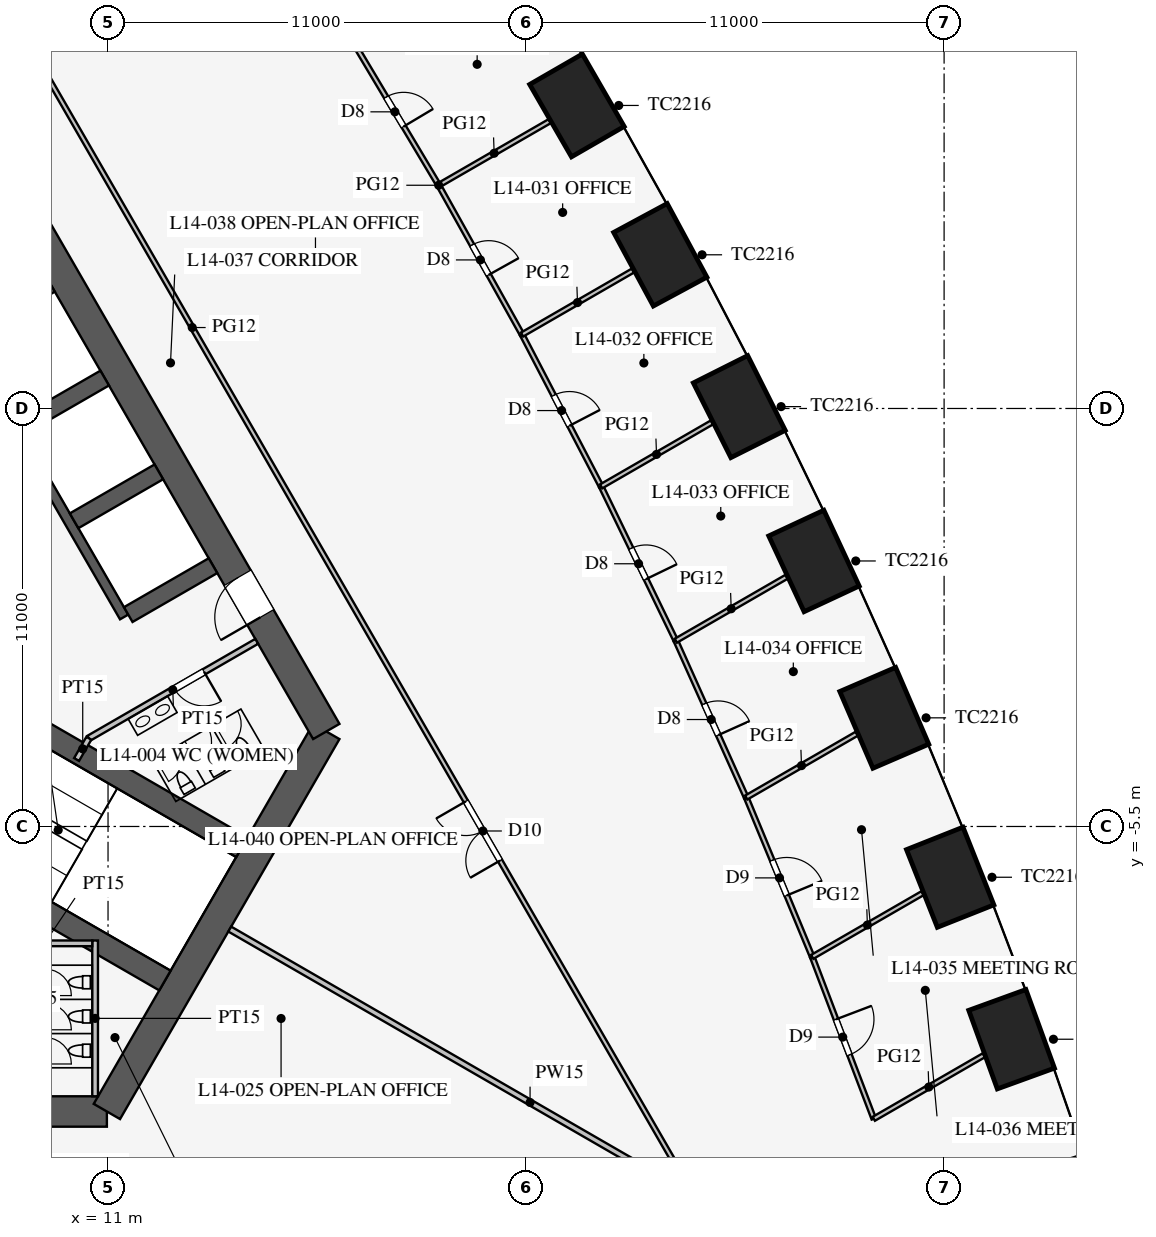
"""IFC4 building model, lengths in metres.
Left out: names, types, materials, properties, quantities, classifications, styles, units other than length and angle.
Written with IfcOpenShell. Run it as: python <this file> out.ifc"""

import sys

from ifc_helpers import new_model, si_unit, direction, frame, frame_2d, origin, origin_2d, place, context, subcontext, project, spatial, rectangle, extrude, element, fill, save


model = new_model("IFC4")
c1 = context("Model", 3, precision=1e-05, world=origin(), true_north=direction((0.0, 1.0)))
c2 = subcontext(c1, "Body", "Model", "MODEL_VIEW")
j1 = project(units=[si_unit("LENGTHUNIT", "METRE"), si_unit("PLANEANGLEUNIT", "RADIAN")], contexts=[c1])
p1 = place(None, origin())
s1 = spatial("IfcSite", under=j1, at=p1, CompositionType="ELEMENT")
p2 = place(p1, origin())
s2 = spatial("IfcBuilding", under=s1, at=p2, CompositionType="ELEMENT")
p3 = place(p2, frame((0.0, 0.0, 62.7)))
s3 = spatial("IfcBuildingStorey", under=s2, at=p3, CompositionType="ELEMENT", Elevation=62.7)
for number, where, z_axis, x_axis in (
    (1, (36.262, -15.438, 0.0), (0.0, 0.0, 1.0), (-0.3, 0.954, 0.0)),
    (2, (34.776, -11.099, 0.0), (0.0, 0.0, 1.0), (-0.342, 0.94, 0.0)),
    (3, (33.16, -6.836, 0.0), (0.0, 0.0, 1.0), (-0.369, 0.929, 0.0)),
    (4, (31.426, -2.641, 0.0), (0.0, 0.0, 1.0), (-0.396, 0.918, 0.0)),
    (5, (29.576, 1.487, 0.0), (0.0, 0.0, 1.0), (-0.423, 0.906, 0.0)),
    (6, (27.611, 5.549, 0.0), (0.0, 0.0, 1.0), (-0.449, 0.894, 0.0)),
    (7, (25.531, 9.544, 0.0), (0.0, 0.0, 1.0), (-0.475, 0.88, 0.0)),
    (8, (23.338, 13.474, 0.0), (0.0, 0.0, 1.0), (-0.5, 0.866, 0.0)),
):
    element("IfcColumn", number, at=place(p3, frame(where, z_axis=z_axis, x_axis=x_axis)), inside=s3, PredefinedType="COLUMN", context=c2, shape_type="SweptSolid", body=[
        extrude(rectangle(XDim=2.2, YDim=1.6, at=origin_2d()), origin(), (0.0, 0.0, 1.0), 4.2),
    ])
p4 = place(p3, frame((-10.97, -13.0, 0.0), z_axis=(0.0, 0.0, 1.0), x_axis=(1.0, 0.0, 0.0)))
e9 = element("IfcWall", 9, at=p4, inside=s3, PredefinedType="SHEAR", context=c2, shape_type="SweptSolid", body=[
    extrude(rectangle(XDim=21.939, YDim=0.8, at=frame_2d((10.97, 0.0))), origin(), (0.0, 0.0, 1.0), 4.2),
])
p5 = place(p4, frame((17.27, 0.0, 0.0)))
e10 = element("IfcOpeningElement", 10, at=p5, cuts=e9, PredefinedType="OPENING", context=c2, shape_type="SweptSolid", body=[
    extrude(rectangle(XDim=1.2, YDim=2.1, at=frame_2d((0.6, 1.05))), frame((0.0, 0.41, 0.0), z_axis=(0.0, -1.0, 0.0), x_axis=(1.0, 0.0, 0.0)), (0.0, 0.0, 1.0), 0.82),
])
p6 = place(p4, frame((3.47, 0.0, 0.0)))
e11 = element("IfcOpeningElement", 11, at=p6, cuts=e9, PredefinedType="OPENING", context=c2, shape_type="SweptSolid", body=[
    extrude(rectangle(XDim=1.2, YDim=2.1, at=frame_2d((0.6, 1.05))), frame((0.0, 0.41, 0.0), z_axis=(0.0, -1.0, 0.0), x_axis=(1.0, 0.0, 0.0)), (0.0, 0.0, 1.0), 0.82),
])
p7 = place(p3, frame((10.97, -13.0, 0.0), z_axis=(0.0, 0.0, 1.0), x_axis=(0.499995765644, 0.866027848477, 0.0)))
e12 = element("IfcWall", 12, at=p7, inside=s3, PredefinedType="SHEAR", context=c2, shape_type="SweptSolid", body=[
    extrude(rectangle(XDim=11.547, YDim=0.8, at=frame_2d((5.773, 0.0))), origin(), (0.0, 0.0, 1.0), 4.2),
])
p8 = place(p3, frame((16.743, -3.0, 0.0), z_axis=(0.0, 0.0, 1.0), x_axis=(-0.500002442456, 0.866023993627, 0.0)))
e13 = element("IfcWall", 13, at=p8, inside=s3, PredefinedType="SHEAR", context=c2, shape_type="SweptSolid", body=[
    extrude(rectangle(XDim=21.939, YDim=0.8, at=frame_2d((10.97, 0.0))), origin(), (0.0, 0.0, 1.0), 4.2),
])
p9 = place(p8, frame((17.27, 0.0, 0.0)))
e14 = element("IfcOpeningElement", 14, at=p9, cuts=e13, PredefinedType="OPENING", context=c2, shape_type="SweptSolid", body=[
    extrude(rectangle(XDim=1.2, YDim=2.1, at=frame_2d((0.6, 1.05))), frame((0.0, 0.41, 0.0), z_axis=(0.0, -1.0, 0.0), x_axis=(1.0, 0.0, 0.0)), (0.0, 0.0, 1.0), 0.82),
])
p10 = place(p8, frame((3.47, 0.0, 0.0)))
e15 = element("IfcOpeningElement", 15, at=p10, cuts=e13, PredefinedType="OPENING", context=c2, shape_type="SweptSolid", body=[
    extrude(rectangle(XDim=1.2, YDim=2.1, at=frame_2d((0.6, 1.05))), frame((0.0, 0.41, 0.0), z_axis=(0.0, -1.0, 0.0), x_axis=(1.0, 0.0, 0.0)), (0.0, 0.0, 1.0), 0.82),
])
p11 = place(p3, frame((11.424, 0.014, 0.0), z_axis=(0.0, 0.0, 1.0), x_axis=(-0.500001763848, 0.866024385424, 0.0)))
e16 = element("IfcWall", 16, at=p11, inside=s3, PredefinedType="SHEAR", context=c2, shape_type="SweptSolid", body=[
    extrude(rectangle(XDim=11.4, YDim=0.25, at=frame_2d((5.7, 0.0))), origin(), (0.0, 0.0, 1.0), 4.2),
])
for number, where, z_axis, x_axis in (
    (17, (11.532, 0.076, 0.0), (0.0, 0.0, 1.0), (0.866, 0.5, 0.0)),
    (18, (10.107, 2.544, 0.0), (0.0, 0.0, 1.0), (0.866, 0.5, 0.0)),
    (19, (8.682, 5.012, 0.0), (0.0, 0.0, 1.0), (0.866, 0.5, 0.0)),
    (20, (7.257, 7.481, 0.0), (0.0, 0.0, 1.0), (0.866, 0.5, 0.0)),
):
    element("IfcWall", number, at=place(p3, frame(where, z_axis=z_axis, x_axis=x_axis)), inside=s3, PredefinedType="SHEAR", context=c2, shape_type="SweptSolid", body=[
        extrude(rectangle(XDim=2.575, YDim=0.45, at=frame_2d((1.288, 0.0))), origin(), (0.0, 0.0, 1.0), 4.2),
    ])
for number, where, z_axis, x_axis in (
    (21, (4.638, -5.016, 0.0), (0.0, 0.0, 1.0), (0.866, -0.5, 0.0)),
    (22, (6.663, -1.509, 0.0), (0.0, 0.0, 1.0), (0.866, -0.5, 0.0)),
):
    element("IfcWall", number, at=place(p3, frame(where, z_axis=z_axis, x_axis=x_axis)), inside=s3, PredefinedType="SHEAR", context=c2, shape_type="SweptSolid", body=[
        extrude(rectangle(XDim=9.075, YDim=0.6, at=frame_2d((4.538, 0.0))), origin(), (0.0, 0.0, 1.0), 4.2),
    ])
p12 = place(p3, frame((10.495, -3.178, 0.0), z_axis=(0.0, 0.0, 1.0), x_axis=(0.86602216432, 0.500005610874, 0.0)))
e23 = element("IfcWall", 23, at=p12, inside=s3, PredefinedType="PARTITIONING", context=c2, shape_type="SweptSolid", body=[
    extrude(rectangle(XDim=5.1, YDim=0.15, at=frame_2d((2.55, 0.0))), origin(), (0.0, 0.0, 1.0), 4.0),
])
p13 = place(p12, frame((2.6, 0.0, 0.0)))
e24 = element("IfcOpeningElement", 24, at=p13, cuts=e23, PredefinedType="OPENING", context=c2, shape_type="SweptSolid", body=[
    extrude(rectangle(XDim=0.9, YDim=2.1, at=frame_2d((0.45, 1.05))), frame((0.0, 0.085, 0.0), z_axis=(0.0, -1.0, 0.0), x_axis=(1.0, 0.0, 0.0)), (0.0, 0.0, 1.0), 0.17),
])
p14 = place(p3, frame((10.495, -3.178, 0.0), z_axis=(0.0, 0.0, 1.0), x_axis=(-0.499842556608, -0.866116284689, 0.0)))
e25 = element("IfcWall", 25, at=p14, inside=s3, PredefinedType="PARTITIONING", context=c2, shape_type="SweptSolid", body=[
    extrude(rectangle(XDim=0.645, YDim=0.15, at=frame_2d((0.323, 0.0))), origin(), (0.0, 0.0, 1.0), 4.0),
])
p15 = place(p3, frame((10.66, -8.5, 0.0), z_axis=(0.0, 0.0, 1.0), x_axis=(0.0, -1.0, 0.0)))
e26 = element("IfcWall", 26, at=p15, inside=s3, PredefinedType="PARTITIONING", context=c2, shape_type="SweptSolid", body=[
    extrude(rectangle(XDim=4.1, YDim=0.15, at=frame_2d((2.05, 0.0))), origin(), (0.0, 0.0, 1.0), 4.0),
])
p16 = place(p3, frame((8.075, -8.575, 0.0), z_axis=(0.0, 0.0, 1.0), x_axis=(1.0, 0.0, 0.0)))
e27 = element("IfcWall", 27, at=p16, inside=s3, PredefinedType="PARTITIONING", context=c2, shape_type="SweptSolid", body=[
    extrude(rectangle(XDim=2.51, YDim=0.15, at=frame_2d((1.255, 0.0))), origin(), (0.0, 0.0, 1.0), 4.0),
])
p17 = place(p3, frame((14.203, -8.2, 0.0), z_axis=(0.0, 0.0, 1.0), x_axis=(0.866024965723, -0.500000758745, 0.0)))
e28 = element("IfcWall", 28, at=p17, inside=s3, PredefinedType="PARTITIONING", context=c2, shape_type="SweptSolid", body=[
    extrude(rectangle(XDim=18.25, YDim=0.15, at=frame_2d((9.125, 0.0))), origin(), (0.0, 0.0, 1.0), 2.3),
])
p18 = place(p3, frame((26.415, -15.231, 0.0), z_axis=(0.0, 0.0, 1.0), x_axis=(-0.50000091641, 0.866024874695, 0.0)))
e29 = element("IfcWall", 29, at=p18, inside=s3, PredefinedType="PARTITIONING", context=c2, shape_type="SweptSolid", body=[
    extrude(rectangle(XDim=52.796, YDim=0.12, at=frame_2d((26.398, 0.0))), origin(), (0.0, 0.0, 1.0), 2.9),
])
p19 = place(p18, frame((10.2, 0.0, 0.15)))
e30 = element("IfcOpeningElement", 30, at=p19, cuts=e29, PredefinedType="OPENING", context=c2, shape_type="SweptSolid", body=[
    extrude(rectangle(XDim=1.8, YDim=2.1, at=frame_2d((0.9, 1.05))), frame((0.0, 0.07, 0.0), z_axis=(0.0, -1.0, 0.0), x_axis=(1.0, 0.0, 0.0)), (0.0, 0.0, 1.0), 0.14),
])
p20 = place(p18, frame((40.8, 0.0, 0.15)))
e31 = element("IfcOpeningElement", 31, at=p20, cuts=e29, PredefinedType="OPENING", context=c2, shape_type="SweptSolid", body=[
    extrude(rectangle(XDim=1.8, YDim=2.1, at=frame_2d((0.9, 1.05))), frame((0.0, 0.07, 0.0), z_axis=(0.0, -1.0, 0.0), x_axis=(1.0, 0.0, 0.0)), (0.0, 0.0, 1.0), 0.14),
])
p21 = place(p3, frame((19.701, 11.374, 0.0), z_axis=(0.0, 0.0, 1.0), x_axis=(-0.512483962191, 0.858696796604, 0.0)))
e32 = element("IfcWall", 32, at=p21, inside=s3, PredefinedType="PARTITIONING", context=c2, shape_type="SweptSolid", body=[
    extrude(rectangle(XDim=4.5, YDim=0.12, at=frame_2d((2.25, 0.0))), origin(), (0.0, 0.0, 1.0), 2.9),
])
p22 = place(p21, frame((1.8, 0.0, 0.15)))
e33 = element("IfcOpeningElement", 33, at=p22, cuts=e32, PredefinedType="OPENING", context=c2, shape_type="SweptSolid", body=[
    extrude(rectangle(XDim=0.9, YDim=2.1, at=frame_2d((0.45, 1.05))), frame((0.0, 0.07, 0.0), z_axis=(0.0, -1.0, 0.0), x_axis=(1.0, 0.0, 0.0)), (0.0, 0.0, 1.0), 0.14),
])
p23 = place(p3, frame((25.941, -0.611, 0.0), z_axis=(0.0, 0.0, 1.0), x_axis=(-0.435857917556, 0.900015486369, 0.0)))
e34 = element("IfcWall", 34, at=p23, inside=s3, PredefinedType="PARTITIONING", context=c2, shape_type="SweptSolid", body=[
    extrude(rectangle(XDim=4.512, YDim=0.12, at=frame_2d((2.256, 0.0))), origin(), (0.0, 0.0, 1.0), 2.9),
])
p24 = place(p23, frame((1.8, 0.0, 0.15)))
e35 = element("IfcOpeningElement", 35, at=p24, cuts=e34, PredefinedType="OPENING", context=c2, shape_type="SweptSolid", body=[
    extrude(rectangle(XDim=0.9, YDim=2.1, at=frame_2d((0.45, 1.05))), frame((0.0, 0.07, 0.0), z_axis=(0.0, -1.0, 0.0), x_axis=(1.0, 0.0, 0.0)), (0.0, 0.0, 1.0), 0.14),
])
p25 = place(p3, frame((27.793, -4.738, 0.0), z_axis=(0.0, 0.0, 1.0), x_axis=(-0.409451055745, 0.912332084796, 0.0)))
e36 = element("IfcWall", 36, at=p25, inside=s3, PredefinedType="PARTITIONING", context=c2, shape_type="SweptSolid", body=[
    extrude(rectangle(XDim=4.523, YDim=0.12, at=frame_2d((2.262, 0.0))), origin(), (0.0, 0.0, 1.0), 2.9),
])
p26 = place(p25, frame((1.8, 0.0, 0.15)))
e37 = element("IfcOpeningElement", 37, at=p26, cuts=e36, PredefinedType="OPENING", context=c2, shape_type="SweptSolid", body=[
    extrude(rectangle(XDim=0.9, YDim=2.1, at=frame_2d((0.45, 1.05))), frame((0.0, 0.07, 0.0), z_axis=(0.0, -1.0, 0.0), x_axis=(1.0, 0.0, 0.0)), (0.0, 0.0, 1.0), 0.14),
])
p27 = place(p3, frame((29.53, -8.932, 0.0), z_axis=(0.0, 0.0, 1.0), x_axis=(-0.382639984525, 0.923897527999, 0.0)))
e38 = element("IfcWall", 38, at=p27, inside=s3, PredefinedType="PARTITIONING", context=c2, shape_type="SweptSolid", body=[
    extrude(rectangle(XDim=4.539, YDim=0.12, at=frame_2d((2.27, 0.0))), origin(), (0.0, 0.0, 1.0), 2.9),
])
p28 = place(p27, frame((1.75, 0.0, 0.15)))
e39 = element("IfcOpeningElement", 39, at=p28, cuts=e38, PredefinedType="OPENING", context=c2, shape_type="SweptSolid", body=[
    extrude(rectangle(XDim=1.0, YDim=2.1, at=frame_2d((0.5, 1.05))), frame((0.0, 0.07, 0.0), z_axis=(0.0, -1.0, 0.0), x_axis=(1.0, 0.0, 0.0)), (0.0, 0.0, 1.0), 0.14),
])
p29 = place(p3, frame((31.15, -13.192, 0.0), z_axis=(0.0, 0.0, 1.0), x_axis=(-0.355369393324, 0.934725946087, 0.0)))
e40 = element("IfcWall", 40, at=p29, inside=s3, PredefinedType="PARTITIONING", context=c2, shape_type="SweptSolid", body=[
    extrude(rectangle(XDim=4.558, YDim=0.12, at=frame_2d((2.279, 0.0))), origin(), (0.0, 0.0, 1.0), 2.9),
])
p30 = place(p29, frame((1.8, 0.0, 0.15)))
e41 = element("IfcOpeningElement", 41, at=p30, cuts=e40, PredefinedType="OPENING", context=c2, shape_type="SweptSolid", body=[
    extrude(rectangle(XDim=1.0, YDim=2.1, at=frame_2d((0.5, 1.05))), frame((0.0, 0.07, 0.0), z_axis=(0.0, -1.0, 0.0), x_axis=(1.0, 0.0, 0.0)), (0.0, 0.0, 1.0), 0.14),
])
p31 = place(p3, frame((21.895, 7.445, 0.0), z_axis=(0.0, 0.0, 1.0), x_axis=(-0.487415216275, 0.87317031955, 0.0)))
e42 = element("IfcWall", 42, at=p31, inside=s3, PredefinedType="PARTITIONING", context=c2, shape_type="SweptSolid", body=[
    extrude(rectangle(XDim=4.5, YDim=0.12, at=frame_2d((2.25, 0.0))), origin(), (0.0, 0.0, 1.0), 2.9),
])
p32 = place(p31, frame((1.8, 0.0, 0.15)))
e43 = element("IfcOpeningElement", 43, at=p32, cuts=e42, PredefinedType="OPENING", context=c2, shape_type="SweptSolid", body=[
    extrude(rectangle(XDim=0.9, YDim=2.1, at=frame_2d((0.45, 1.05))), frame((0.0, 0.07, 0.0), z_axis=(0.0, -1.0, 0.0), x_axis=(1.0, 0.0, 0.0)), (0.0, 0.0, 1.0), 0.14),
])
p33 = place(p3, frame((23.975, 3.449, 0.0), z_axis=(0.0, 0.0, 1.0), x_axis=(-0.461810056307, 0.886978845235, 0.0)))
e44 = element("IfcWall", 44, at=p33, inside=s3, PredefinedType="PARTITIONING", context=c2, shape_type="SweptSolid", body=[
    extrude(rectangle(XDim=4.504, YDim=0.12, at=frame_2d((2.252, 0.0))), origin(), (0.0, 0.0, 1.0), 2.9),
])
p34 = place(p33, frame((1.8, 0.0, 0.15)))
e45 = element("IfcOpeningElement", 45, at=p34, cuts=e44, PredefinedType="OPENING", context=c2, shape_type="SweptSolid", body=[
    extrude(rectangle(XDim=0.9, YDim=2.1, at=frame_2d((0.45, 1.05))), frame((0.0, 0.07, 0.0), z_axis=(0.0, -1.0, 0.0), x_axis=(1.0, 0.0, 0.0)), (0.0, 0.0, 1.0), 0.14),
])
p35 = place(p3, frame((19.701, 11.374, 0.0), z_axis=(0.0, 0.0, 1.0), x_axis=(0.866014270972, 0.500019282102, 0.0)))
e46 = element("IfcWall", 46, at=p35, inside=s3, PredefinedType="PARTITIONING", context=c2, shape_type="SweptSolid", body=[
    extrude(rectangle(XDim=3.37, YDim=0.12, at=frame_2d((1.685, 0.0))), origin(), (0.0, 0.0, 1.0), 2.8),
])
p36 = place(p3, frame((25.941, -0.611, 0.0), z_axis=(0.0, 0.0, 1.0), x_axis=(0.866023625329, 0.500003080363, 0.0)))
e47 = element("IfcWall", 47, at=p36, inside=s3, PredefinedType="PARTITIONING", context=c2, shape_type="SweptSolid", body=[
    extrude(rectangle(XDim=3.364, YDim=0.12, at=frame_2d((1.682, 0.0))), origin(), (0.0, 0.0, 1.0), 2.6),
])
p37 = place(p3, frame((27.793, -4.738, 0.0), z_axis=(0.0, 0.0, 1.0), x_axis=(0.866029446706, 0.499992997389, 0.0)))
e48 = element("IfcWall", 48, at=p37, inside=s3, PredefinedType="PARTITIONING", context=c2, shape_type="SweptSolid", body=[
    extrude(rectangle(XDim=3.359, YDim=0.12, at=frame_2d((1.679, 0.0))), origin(), (0.0, 0.0, 1.0), 2.6),
])
p38 = place(p3, frame((29.53, -8.932, 0.0), z_axis=(0.0, 0.0, 1.0), x_axis=(0.866038859646, 0.49997669304, 0.0)))
e49 = element("IfcWall", 49, at=p38, inside=s3, PredefinedType="PARTITIONING", context=c2, shape_type="SweptSolid", body=[
    extrude(rectangle(XDim=3.353, YDim=0.12, at=frame_2d((1.676, 0.0))), origin(), (0.0, 0.0, 1.0), 2.8),
])
p39 = place(p3, frame((31.15, -13.192, 0.0), z_axis=(0.0, 0.0, 1.0), x_axis=(0.866033651025, 0.499985715088, 0.0)))
e50 = element("IfcWall", 50, at=p39, inside=s3, PredefinedType="PARTITIONING", context=c2, shape_type="SweptSolid", body=[
    extrude(rectangle(XDim=3.345, YDim=0.12, at=frame_2d((1.672, 0.0))), origin(), (0.0, 0.0, 1.0), 2.9),
])
p40 = place(p3, frame((21.895, 7.445, 0.0), z_axis=(0.0, 0.0, 1.0), x_axis=(0.866022675988, 0.500004724652, 0.0)))
e51 = element("IfcWall", 51, at=p40, inside=s3, PredefinedType="PARTITIONING", context=c2, shape_type="SweptSolid", body=[
    extrude(rectangle(XDim=3.369, YDim=0.12, at=frame_2d((1.685, 0.0))), origin(), (0.0, 0.0, 1.0), 2.8),
])
p41 = place(p3, frame((23.975, 3.449, 0.0), z_axis=(0.0, 0.0, 1.0), x_axis=(0.866039498442, 0.499975586543, 0.0)))
e52 = element("IfcWall", 52, at=p41, inside=s3, PredefinedType="PARTITIONING", context=c2, shape_type="SweptSolid", body=[
    extrude(rectangle(XDim=3.367, YDim=0.12, at=frame_2d((1.684, 0.0))), origin(), (0.0, 0.0, 1.0), 2.8),
])
p42 = place(p13, frame((0.9, 0.0, 0.0), z_axis=(0.0, 0.0, 1.0), x_axis=(-1.0, 0.0, 0.0)))
e53 = element("IfcDoor", 53, at=p42, inside=s3, OperationType="SINGLE_SWING_LEFT", PredefinedType="DOOR", context=c2, shape_type="SweptSolid", body=[
    extrude(rectangle(XDim=0.9, YDim=2.1, at=frame_2d((0.45, 1.05))), frame((0.0, 0.025, 0.0), z_axis=(0.0, -1.0, 0.0), x_axis=(1.0, 0.0, 0.0)), (0.0, 0.0, 1.0), 0.05),
])
fill(e24, e53)
p43 = place(p10, origin())
e54 = element("IfcDoor", 54, at=p43, inside=s3, OperationType="SINGLE_SWING_LEFT", PredefinedType="DOOR", context=c2, shape_type="SweptSolid", body=[
    extrude(rectangle(XDim=1.2, YDim=2.1, at=frame_2d((0.6, 1.05))), frame((0.0, 0.025, 0.0), z_axis=(0.0, -1.0, 0.0), x_axis=(1.0, 0.0, 0.0)), (0.0, 0.0, 1.0), 0.05),
])
fill(e15, e54)
p44 = place(p22, frame((0.9, 0.0, 0.0), z_axis=(0.0, 0.0, 1.0), x_axis=(-1.0, 0.0, 0.0)))
e55 = element("IfcDoor", 55, at=p44, inside=s3, OperationType="SINGLE_SWING_RIGHT", PredefinedType="DOOR", context=c2, shape_type="SweptSolid", body=[
    extrude(rectangle(XDim=0.9, YDim=2.1, at=frame_2d((0.45, 1.05))), frame((0.0, 0.025, 0.0), z_axis=(0.0, -1.0, 0.0), x_axis=(1.0, 0.0, 0.0)), (0.0, 0.0, 1.0), 0.05),
])
fill(e33, e55)
p45 = place(p32, frame((0.9, 0.0, 0.0), z_axis=(0.0, 0.0, 1.0), x_axis=(-1.0, 0.0, 0.0)))
e56 = element("IfcDoor", 56, at=p45, inside=s3, OperationType="SINGLE_SWING_RIGHT", PredefinedType="DOOR", context=c2, shape_type="SweptSolid", body=[
    extrude(rectangle(XDim=0.9, YDim=2.1, at=frame_2d((0.45, 1.05))), frame((0.0, 0.025, 0.0), z_axis=(0.0, -1.0, 0.0), x_axis=(1.0, 0.0, 0.0)), (0.0, 0.0, 1.0), 0.05),
])
fill(e43, e56)
p46 = place(p34, frame((0.9, 0.0, 0.0), z_axis=(0.0, 0.0, 1.0), x_axis=(-1.0, 0.0, 0.0)))
e57 = element("IfcDoor", 57, at=p46, inside=s3, OperationType="SINGLE_SWING_RIGHT", PredefinedType="DOOR", context=c2, shape_type="SweptSolid", body=[
    extrude(rectangle(XDim=0.9, YDim=2.1, at=frame_2d((0.45, 1.05))), frame((0.0, 0.025, 0.0), z_axis=(0.0, -1.0, 0.0), x_axis=(1.0, 0.0, 0.0)), (0.0, 0.0, 1.0), 0.05),
])
fill(e45, e57)
p47 = place(p24, frame((0.9, 0.0, 0.0), z_axis=(0.0, 0.0, 1.0), x_axis=(-1.0, 0.0, 0.0)))
e58 = element("IfcDoor", 58, at=p47, inside=s3, OperationType="SINGLE_SWING_RIGHT", PredefinedType="DOOR", context=c2, shape_type="SweptSolid", body=[
    extrude(rectangle(XDim=0.9, YDim=2.1, at=frame_2d((0.45, 1.05))), frame((0.0, 0.025, 0.0), z_axis=(0.0, -1.0, 0.0), x_axis=(1.0, 0.0, 0.0)), (0.0, 0.0, 1.0), 0.05),
])
fill(e35, e58)
p48 = place(p26, frame((0.9, 0.0, 0.0), z_axis=(0.0, 0.0, 1.0), x_axis=(-1.0, 0.0, 0.0)))
e59 = element("IfcDoor", 59, at=p48, inside=s3, OperationType="SINGLE_SWING_RIGHT", PredefinedType="DOOR", context=c2, shape_type="SweptSolid", body=[
    extrude(rectangle(XDim=0.9, YDim=2.1, at=frame_2d((0.45, 1.05))), frame((0.0, 0.025, 0.0), z_axis=(0.0, -1.0, 0.0), x_axis=(1.0, 0.0, 0.0)), (0.0, 0.0, 1.0), 0.05),
])
fill(e37, e59)
p49 = place(p28, frame((1.0, 0.0, 0.0), z_axis=(0.0, 0.0, 1.0), x_axis=(-1.0, 0.0, 0.0)))
e60 = element("IfcDoor", 60, at=p49, inside=s3, OperationType="SINGLE_SWING_RIGHT", PredefinedType="DOOR", context=c2, shape_type="SweptSolid", body=[
    extrude(rectangle(XDim=1.0, YDim=2.1, at=frame_2d((0.5, 1.05))), frame((0.0, 0.025, 0.0), z_axis=(0.0, -1.0, 0.0), x_axis=(1.0, 0.0, 0.0)), (0.0, 0.0, 1.0), 0.05),
])
fill(e39, e60)
p50 = place(p30, frame((1.0, 0.0, 0.0), z_axis=(0.0, 0.0, 1.0), x_axis=(-1.0, 0.0, 0.0)))
e61 = element("IfcDoor", 61, at=p50, inside=s3, OperationType="SINGLE_SWING_LEFT", PredefinedType="DOOR", context=c2, shape_type="SweptSolid", body=[
    extrude(rectangle(XDim=1.0, YDim=2.1, at=frame_2d((0.5, 1.05))), frame((0.0, 0.025, 0.0), z_axis=(0.0, -1.0, 0.0), x_axis=(1.0, 0.0, 0.0)), (0.0, 0.0, 1.0), 0.05),
])
fill(e41, e61)
p51 = place(p19, origin())
e62 = element("IfcDoor", 62, at=p51, inside=s3, OperationType="DOUBLE_DOOR_SINGLE_SWING", PredefinedType="DOOR", context=c2, shape_type="SweptSolid", body=[
    extrude(rectangle(XDim=1.8, YDim=2.1, at=frame_2d((0.9, 1.05))), frame((0.0, 0.025, 0.0), z_axis=(0.0, -1.0, 0.0), x_axis=(1.0, 0.0, 0.0)), (0.0, 0.0, 1.0), 0.05),
])
fill(e30, e62)
save(model, sys.argv[1])
